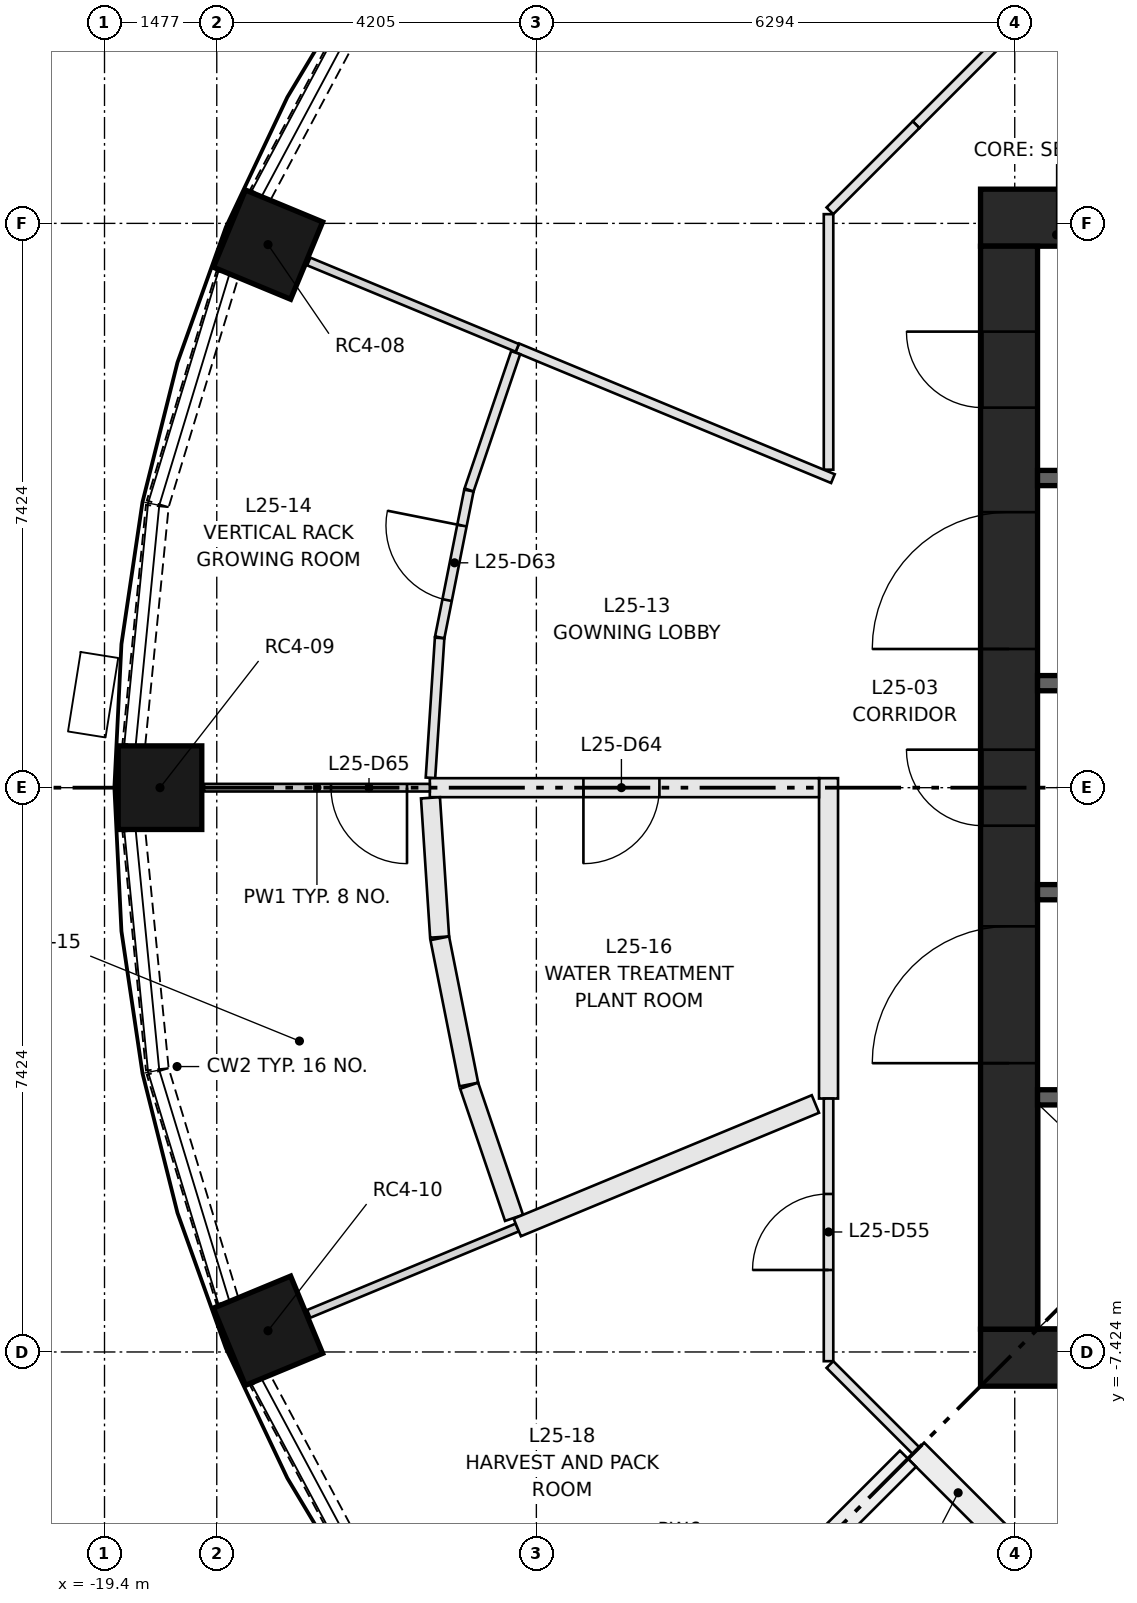
"""IFC4 building model, lengths in metres.
Left out: names, types, materials, properties, quantities, classifications, styles, units other than length and angle.
Written with IfcOpenShell. Run it as: python <this file> out.ifc"""

import sys

from ifc_helpers import new_model, si_unit, direction, frame, frame_2d, origin, origin_2d, place, context, subcontext, project, spatial, rectangle, extrude, element, fill, save


model = new_model("IFC4")
c1 = context("Model", 3, precision=1e-05, world=origin(), true_north=direction((0.0, 1.0)))
c2 = subcontext(c1, "Body", "Model", "MODEL_VIEW")
j1 = project(units=[si_unit("LENGTHUNIT", "METRE"), si_unit("PLANEANGLEUNIT", "RADIAN")], contexts=[c1])
p1 = place(None, origin())
s1 = spatial("IfcSite", under=j1, at=p1, CompositionType="ELEMENT")
p2 = place(p1, origin())
s2 = spatial("IfcBuilding", under=s1, at=p2, CompositionType="ELEMENT")
p3 = place(p2, frame((0.0, 0.0, 98.3)))
s3 = spatial("IfcBuildingStorey", under=s2, at=p3, CompositionType="ELEMENT", Elevation=98.3)
for number, where, z_axis, x_axis in (
    (1, (-17.249, 7.145, 0.0), (0.0, 0.0, 1.0), (-0.924, 0.383, 0.0)),
    (2, (-18.67, 0.0, 0.0), (0.0, 0.0, 1.0), (-1.0, 0.0, 0.0)),
    (3, (-17.249, -7.145, 0.0), (0.0, 0.0, 1.0), (-0.924, -0.383, 0.0)),
):
    element("IfcColumn", number, at=place(p3, frame(where, z_axis=z_axis, x_axis=x_axis)), inside=s3, PredefinedType="COLUMN", context=c2, shape_type="SweptSolid", body=[
        extrude(rectangle(XDim=1.1, YDim=1.1, at=origin_2d()), origin(), (0.0, 0.0, 1.0), 3.65),
    ])
for number, where, z_axis, x_axis in (
    (4, (-7.874, -7.499, 0.0), (0.0, 0.0, 1.0), (1.0, 0.0, 0.0)),
    (5, (-7.874, 7.499, 0.0), (0.0, 0.0, 1.0), (1.0, 0.0, 0.0)),
):
    element("IfcWall", number, at=place(p3, frame(where, z_axis=z_axis, x_axis=x_axis)), inside=s3, PredefinedType="SHEAR", context=c2, shape_type="SweptSolid", body=[
        extrude(rectangle(XDim=15.748, YDim=0.75, at=frame_2d((7.874, 0.0))), origin(), (0.0, 0.0, 1.0), 3.65),
    ])
p4 = place(p3, frame((-7.499, -7.124, 0.0), z_axis=(0.0, 0.0, 1.0), x_axis=(0.0, 1.0, 0.0)))
e6 = element("IfcWall", 6, at=p4, inside=s3, PredefinedType="SHEAR", context=c2, shape_type="SweptSolid", body=[
    extrude(rectangle(XDim=14.248, YDim=0.75, at=frame_2d((7.124, 0.0))), origin(), (0.0, 0.0, 1.0), 3.65),
])
p5 = place(p4, frame((6.624, 0.0, 0.0)))
e7 = element("IfcOpeningElement", 7, at=p5, cuts=e6, PredefinedType="OPENING", context=c2, shape_type="SweptSolid", body=[
    extrude(rectangle(XDim=1.0, YDim=2.1, at=frame_2d((0.5, 1.05))), frame((0.0, 0.385, 0.0), z_axis=(0.0, -1.0, 0.0), x_axis=(1.0, 0.0, 0.0)), (0.0, 0.0, 1.0), 0.77),
])
p6 = place(p4, frame((3.5, 0.0, 0.0)))
e8 = element("IfcOpeningElement", 8, at=p6, cuts=e6, PredefinedType="OPENING", context=c2, shape_type="SweptSolid", body=[
    extrude(rectangle(XDim=1.8, YDim=2.1, at=frame_2d((0.9, 1.05))), frame((0.0, 0.385, 0.0), z_axis=(0.0, -1.0, 0.0), x_axis=(1.0, 0.0, 0.0)), (0.0, 0.0, 1.0), 0.77),
])
p7 = place(p4, frame((8.948, 0.0, 0.0)))
e9 = element("IfcOpeningElement", 9, at=p7, cuts=e6, PredefinedType="OPENING", context=c2, shape_type="SweptSolid", body=[
    extrude(rectangle(XDim=1.8, YDim=2.1, at=frame_2d((0.9, 1.05))), frame((0.0, 0.385, 0.0), z_axis=(0.0, -1.0, 0.0), x_axis=(1.0, 0.0, 0.0)), (0.0, 0.0, 1.0), 0.77),
])
p8 = place(p4, frame((12.124, 0.0, 0.0)))
e10 = element("IfcOpeningElement", 10, at=p8, cuts=e6, PredefinedType="OPENING", context=c2, shape_type="SweptSolid", body=[
    extrude(rectangle(XDim=1.0, YDim=2.1, at=frame_2d((0.5, 1.05))), frame((0.0, 0.385, 0.0), z_axis=(0.0, -1.0, 0.0), x_axis=(1.0, 0.0, 0.0)), (0.0, 0.0, 1.0), 0.77),
])
p9 = place(p3, frame((-7.124, -4.074, 0.0), z_axis=(0.0, 0.0, 1.0), x_axis=(1.0, 0.0, 0.0)))
e11 = element("IfcWall", 11, at=p9, inside=s3, PredefinedType="SHEAR", context=c2, shape_type="SweptSolid", body=[
    extrude(rectangle(XDim=14.248, YDim=0.2, at=frame_2d((7.124, 0.0))), origin(), (0.0, 0.0, 1.0), 3.3),
])
p10 = place(p9, frame((1.069, 0.0, 0.0)))
e12 = element("IfcOpeningElement", 12, at=p10, cuts=e11, PredefinedType="OPENING", context=c2, shape_type="SweptSolid", body=[
    extrude(rectangle(XDim=1.1, YDim=2.1, at=frame_2d((0.55, 1.05))), frame((0.0, 0.11, 0.0), z_axis=(0.0, -1.0, 0.0), x_axis=(1.0, 0.0, 0.0)), (0.0, 0.0, 1.0), 0.22),
])
p11 = place(p9, frame((4.206, 0.0, 0.0)))
e13 = element("IfcOpeningElement", 13, at=p11, cuts=e11, PredefinedType="OPENING", context=c2, shape_type="SweptSolid", body=[
    extrude(rectangle(XDim=1.1, YDim=2.1, at=frame_2d((0.55, 1.05))), frame((0.0, 0.11, 0.0), z_axis=(0.0, -1.0, 0.0), x_axis=(1.0, 0.0, 0.0)), (0.0, 0.0, 1.0), 0.22),
])
p12 = place(p9, frame((6.808, 0.0, 0.0)))
e14 = element("IfcOpeningElement", 14, at=p12, cuts=e11, PredefinedType="OPENING", context=c2, shape_type="SweptSolid", body=[
    extrude(rectangle(XDim=1.0, YDim=2.1, at=frame_2d((0.5, 1.05))), frame((0.0, 0.11, 0.0), z_axis=(0.0, -1.0, 0.0), x_axis=(1.0, 0.0, 0.0)), (0.0, 0.0, 1.0), 0.22),
])
p13 = place(p9, frame((8.777, 0.0, 0.0)))
e15 = element("IfcOpeningElement", 15, at=p13, cuts=e11, PredefinedType="OPENING", context=c2, shape_type="SweptSolid", body=[
    extrude(rectangle(XDim=1.0, YDim=2.1, at=frame_2d((0.5, 1.05))), frame((0.0, 0.11, 0.0), z_axis=(0.0, -1.0, 0.0), x_axis=(1.0, 0.0, 0.0)), (0.0, 0.0, 1.0), 0.22),
])
p14 = place(p9, frame((10.745, 0.0, 0.0)))
e16 = element("IfcOpeningElement", 16, at=p14, cuts=e11, PredefinedType="OPENING", context=c2, shape_type="SweptSolid", body=[
    extrude(rectangle(XDim=1.0, YDim=2.1, at=frame_2d((0.5, 1.05))), frame((0.0, 0.11, 0.0), z_axis=(0.0, -1.0, 0.0), x_axis=(1.0, 0.0, 0.0)), (0.0, 0.0, 1.0), 0.22),
])
p15 = place(p9, frame((12.714, 0.0, 0.0)))
e17 = element("IfcOpeningElement", 17, at=p15, cuts=e11, PredefinedType="OPENING", context=c2, shape_type="SweptSolid", body=[
    extrude(rectangle(XDim=1.0, YDim=2.1, at=frame_2d((0.5, 1.05))), frame((0.0, 0.11, 0.0), z_axis=(0.0, -1.0, 0.0), x_axis=(1.0, 0.0, 0.0)), (0.0, 0.0, 1.0), 0.22),
])
p16 = place(p3, frame((-7.124, 4.074, 0.0), z_axis=(0.0, 0.0, 1.0), x_axis=(1.0, 0.0, 0.0)))
e18 = element("IfcWall", 18, at=p16, inside=s3, PredefinedType="SHEAR", context=c2, shape_type="SweptSolid", body=[
    extrude(rectangle(XDim=7.124, YDim=0.2, at=frame_2d((3.562, 0.0))), origin(), (0.0, 0.0, 1.0), 3.3),
])
for number, where, z_axis, x_axis in (
    (19, (-7.124, -1.375, 0.0), (0.0, 0.0, 1.0), (1.0, 0.0, 0.0)),
    (20, (-7.124, 1.375, 0.0), (0.0, 0.0, 1.0), (1.0, 0.0, 0.0)),
):
    element("IfcWall", number, at=place(p3, frame(where, z_axis=z_axis, x_axis=x_axis)), inside=s3, PredefinedType="SHEAR", context=c2, shape_type="SweptSolid", body=[
        extrude(rectangle(XDim=2.75, YDim=0.2, at=frame_2d((1.375, 0.0))), origin(), (0.0, 0.0, 1.0), 3.3),
    ])
p17 = place(p3, frame((-15.863, 10.582, 0.0), z_axis=(0.0, 0.0, 1.0), x_axis=(-0.471238306932, -0.882005928597, 0.0)))
e21 = element("IfcWall", 21, at=p17, inside=s3, PredefinedType="SOLIDWALL", context=c2, shape_type="SweptSolid", body=[
    extrude(rectangle(XDim=3.157, YDim=0.3, at=frame_2d((1.579, 0.0))), origin(), (0.0, 0.0, 1.0), 0.9),
])
p18 = place(p3, frame((-17.782, 6.756, 0.0), z_axis=(0.0, 0.0, 1.0), x_axis=(-0.290503096001, -0.956874051907, 0.0)))
e22 = element("IfcWall", 22, at=p18, inside=s3, PredefinedType="SOLIDWALL", context=c2, shape_type="SweptSolid", body=[
    extrude(rectangle(XDim=3.157, YDim=0.3, at=frame_2d((1.579, 0.0))), origin(), (0.0, 0.0, 1.0), 0.9),
])
for number, where, z_axis, x_axis in (
    (23, (-18.706, 3.705, 0.0), (0.0, 0.0, 1.0), (-0.098, -0.995, 0.0)),
    (24, (-19.014, -0.564, 0.0), (0.0, 0.0, 1.0), (0.098, -0.995, 0.0)),
):
    element("IfcWall", number, at=place(p3, frame(where, z_axis=z_axis, x_axis=x_axis)), inside=s3, PredefinedType="SOLIDWALL", context=c2, shape_type="SweptSolid", body=[
        extrude(rectangle(XDim=3.156, YDim=0.3, at=frame_2d((1.578, 0.0))), origin(), (0.0, 0.0, 1.0), 0.9),
    ])
p19 = place(p3, frame((-18.7, -3.734, 0.0), z_axis=(0.0, 0.0, 1.0), x_axis=(0.290503096001, -0.956874051907, 0.0)))
e25 = element("IfcWall", 25, at=p19, inside=s3, PredefinedType="SOLIDWALL", context=c2, shape_type="SweptSolid", body=[
    extrude(rectangle(XDim=3.157, YDim=0.3, at=frame_2d((1.579, 0.0))), origin(), (0.0, 0.0, 1.0), 0.9),
])
p20 = place(p3, frame((-17.351, -7.797, 0.0), z_axis=(0.0, 0.0, 1.0), x_axis=(0.471238306932, -0.882005928597, 0.0)))
e26 = element("IfcWall", 26, at=p20, inside=s3, PredefinedType="SOLIDWALL", context=c2, shape_type="SweptSolid", body=[
    extrude(rectangle(XDim=3.157, YDim=0.3, at=frame_2d((1.579, 0.0))), origin(), (0.0, 0.0, 1.0), 0.9),
])
p21 = place(p3, frame((-8.722, 8.722, 0.0), z_axis=(0.0, 0.0, 1.0), x_axis=(0.707030604857, 0.70718294931, 0.0)))
e27 = element("IfcWall", 27, at=p21, inside=s3, PredefinedType="PARTITIONING", context=c2, shape_type="SweptSolid", body=[
    extrude(rectangle(XDim=1.603, YDim=0.125, at=frame_2d((0.801, 0.0))), origin(), (0.0, 0.0, 1.0), 3.3),
])
p22 = place(p3, frame((-9.874, 4.183, 0.0), z_axis=(0.0, 0.0, 1.0), x_axis=(0.0, 1.0, 0.0)))
e28 = element("IfcWall", 28, at=p22, inside=s3, PredefinedType="PARTITIONING", context=c2, shape_type="SweptSolid", body=[
    extrude(rectangle(XDim=3.362, YDim=0.125, at=frame_2d((1.681, 0.0))), origin(), (0.0, 0.0, 1.0), 3.3),
])
p23 = place(p3, frame((-9.856, 7.589, 0.0), z_axis=(0.0, 0.0, 1.0), x_axis=(0.70718294931, 0.707030604857, 0.0)))
e29 = element("IfcWall", 29, at=p23, inside=s3, PredefinedType="PARTITIONING", context=c2, shape_type="SweptSolid", body=[
    extrude(rectangle(XDim=1.603, YDim=0.125, at=frame_2d((0.801, 0.0))), origin(), (0.0, 0.0, 1.0), 3.3),
])
p24 = place(p3, frame((-9.874, -4.09, 0.0), z_axis=(0.0, 0.0, 1.0), x_axis=(0.0, 1.0, 0.0)))
e30 = element("IfcWall", 30, at=p24, inside=s3, PredefinedType="PARTITIONING", context=c2, shape_type="SweptSolid", body=[
    extrude(rectangle(XDim=4.215, YDim=0.25, at=frame_2d((2.107, 0.0))), origin(), (0.0, 0.0, 1.0), 3.3),
])
p25 = place(p3, frame((-9.874, -7.545, 0.0), z_axis=(0.0, 0.0, 1.0), x_axis=(0.0, 1.0, 0.0)))
e31 = element("IfcWall", 31, at=p25, inside=s3, PredefinedType="PARTITIONING", context=c2, shape_type="SweptSolid", body=[
    extrude(rectangle(XDim=3.455, YDim=0.125, at=frame_2d((1.728, 0.0))), origin(), (0.0, 0.0, 1.0), 3.3),
])
p26 = place(p25, frame((1.2, 0.0, 0.0)))
e32 = element("IfcOpeningElement", 32, at=p26, cuts=e31, PredefinedType="OPENING", context=c2, shape_type="SweptSolid", body=[
    extrude(rectangle(XDim=1.0, YDim=2.1, at=frame_2d((0.5, 1.05))), frame((0.0, 0.073, 0.0), z_axis=(0.0, -1.0, 0.0), x_axis=(1.0, 0.0, 0.0)), (0.0, 0.0, 1.0), 0.145),
])
p27 = place(p3, frame((-8.722, -8.722, 0.0), z_axis=(0.0, 0.0, 1.0), x_axis=(-0.70718294931, 0.707030604857, 0.0)))
e33 = element("IfcWall", 33, at=p27, inside=s3, PredefinedType="PARTITIONING", context=c2, shape_type="SweptSolid", body=[
    extrude(rectangle(XDim=1.603, YDim=0.125, at=frame_2d((0.801, 0.0))), origin(), (0.0, 0.0, 1.0), 3.3),
])
p28 = place(p3, frame((-7.615, -9.83, 0.0), z_axis=(0.0, 0.0, 1.0), x_axis=(-0.707028841614, 0.70718471217, 0.0)))
e34 = element("IfcWall", 34, at=p28, inside=s3, PredefinedType="PARTITIONING", context=c2, shape_type="SweptSolid", body=[
    extrude(rectangle(XDim=1.566, YDim=0.3, at=frame_2d((0.783, 0.0))), origin(), (0.0, 0.0, 1.0), 3.3),
])
p29 = place(p3, frame((-9.816, 4.066, 0.0), z_axis=(0.0, 0.0, 1.0), x_axis=(-0.923867212496, 0.382713174158, 0.0)))
e35 = element("IfcWall", 35, at=p29, inside=s3, PredefinedType="PARTITIONING", context=c2, shape_type="SweptSolid", body=[
    extrude(rectangle(XDim=4.495, YDim=0.125, at=frame_2d((2.248, 0.0))), origin(), (0.0, 0.0, 1.0), 3.3),
])
p30 = place(p3, frame((-13.969, 5.786, 0.0), z_axis=(0.0, 0.0, 1.0), x_axis=(-0.923889594764, 0.382659139036, 0.0)))
e36 = element("IfcWall", 36, at=p30, inside=s3, PredefinedType="PARTITIONING", context=c2, shape_type="SweptSolid", body=[
    extrude(rectangle(XDim=2.97, YDim=0.11, at=frame_2d((1.485, 0.0))), origin(), (0.0, 0.0, 1.0), 3.3),
])
p31 = place(p3, frame((-15.112, 0.129, 0.0), z_axis=(0.0, 0.0, 1.0), x_axis=(0.065394347625, 0.997859498777, 0.0)))
e37 = element("IfcWall", 37, at=p31, inside=s3, PredefinedType="PARTITIONING", context=c2, shape_type="SweptSolid", body=[
    extrude(rectangle(XDim=1.844, YDim=0.125, at=frame_2d((0.922, 0.0))), origin(), (0.0, 0.0, 1.0), 3.3),
])
p32 = place(p3, frame((-14.99, 1.978, 0.0), z_axis=(0.0, 0.0, 1.0), x_axis=(0.194995562173, 0.980804124549, 0.0)))
e38 = element("IfcWall", 38, at=p32, inside=s3, PredefinedType="PARTITIONING", context=c2, shape_type="SweptSolid", body=[
    extrude(rectangle(XDim=1.969, YDim=0.125, at=frame_2d((0.985, 0.0))), origin(), (0.0, 0.0, 1.0), 3.3),
])
p33 = place(p32, frame((0.5, 0.0, 0.0)))
e39 = element("IfcOpeningElement", 39, at=p33, cuts=e38, PredefinedType="OPENING", context=c2, shape_type="SweptSolid", body=[
    extrude(rectangle(XDim=1.0, YDim=2.1, at=frame_2d((0.5, 1.05))), frame((0.0, 0.073, 0.0), z_axis=(0.0, -1.0, 0.0), x_axis=(1.0, 0.0, 0.0)), (0.0, 0.0, 1.0), 0.145),
])
p34 = place(p3, frame((-14.604, 3.917, 0.0), z_axis=(0.0, 0.0, 1.0), x_axis=(0.321484961169, 0.946914684511, 0.0)))
e40 = element("IfcWall", 40, at=p34, inside=s3, PredefinedType="PARTITIONING", context=c2, shape_type="SweptSolid", body=[
    extrude(rectangle(XDim=1.907, YDim=0.125, at=frame_2d((0.954, 0.0))), origin(), (0.0, 0.0, 1.0), 3.3),
])
p35 = place(p3, frame((-9.999, 0.0, 0.0), z_axis=(0.0, 0.0, 1.0), x_axis=(-1.0, 0.0, 0.0)))
e41 = element("IfcWall", 41, at=p35, inside=s3, PredefinedType="PARTITIONING", context=c2, shape_type="SweptSolid", body=[
    extrude(rectangle(XDim=5.121, YDim=0.25, at=frame_2d((2.561, 0.0))), origin(), (0.0, 0.0, 1.0), 3.3),
])
p36 = place(p35, frame((2.1, 0.0, 0.0)))
e42 = element("IfcOpeningElement", 42, at=p36, cuts=e41, PredefinedType="OPENING", context=c2, shape_type="SweptSolid", body=[
    extrude(rectangle(XDim=1.0, YDim=2.1, at=frame_2d((0.5, 1.05))), frame((0.0, 0.135, 0.0), z_axis=(0.0, -1.0, 0.0), x_axis=(1.0, 0.0, 0.0)), (0.0, 0.0, 1.0), 0.27),
])
p37 = place(p3, frame((-15.12, 0.0, 0.0), z_axis=(0.0, 0.0, 1.0), x_axis=(-1.0, 0.0, 0.0)))
e43 = element("IfcWall", 43, at=p37, inside=s3, PredefinedType="PARTITIONING", context=c2, shape_type="SweptSolid", body=[
    extrude(rectangle(XDim=2.97, YDim=0.1, at=frame_2d((1.485, 0.0))), origin(), (0.0, 0.0, 1.0), 3.3),
])
p38 = place(p37, frame((0.3, 0.0, 0.0)))
e44 = element("IfcOpeningElement", 44, at=p38, cuts=e43, PredefinedType="OPENING", context=c2, shape_type="SweptSolid", body=[
    extrude(rectangle(XDim=1.0, YDim=2.1, at=frame_2d((0.5, 1.05))), frame((0.0, 0.06, 0.0), z_axis=(0.0, -1.0, 0.0), x_axis=(1.0, 0.0, 0.0)), (0.0, 0.0, 1.0), 0.12),
])
p39 = place(p3, frame((-15.111, -0.133, 0.0), z_axis=(0.0, 0.0, 1.0), x_axis=(0.065424560105, -0.997857518354, 0.0)))
e45 = element("IfcWall", 45, at=p39, inside=s3, PredefinedType="PARTITIONING", context=c2, shape_type="SweptSolid", body=[
    extrude(rectangle(XDim=1.836, YDim=0.25, at=frame_2d((0.918, 0.0))), origin(), (0.0, 0.0, 1.0), 3.3),
])
p40 = place(p3, frame((-14.989, -1.982, 0.0), z_axis=(0.0, 0.0, 1.0), x_axis=(0.195062715887, -0.9807907712, 0.0)))
e46 = element("IfcWall", 46, at=p40, inside=s3, PredefinedType="PARTITIONING", context=c2, shape_type="SweptSolid", body=[
    extrude(rectangle(XDim=1.961, YDim=0.25, at=frame_2d((0.98, 0.0))), origin(), (0.0, 0.0, 1.0), 3.3),
])
p41 = place(p3, frame((-14.602, -3.921, 0.0), z_axis=(0.0, 0.0, 1.0), x_axis=(0.321528438759, -0.946899922415, 0.0)))
e47 = element("IfcWall", 47, at=p41, inside=s3, PredefinedType="PARTITIONING", context=c2, shape_type="SweptSolid", body=[
    extrude(rectangle(XDim=1.836, YDim=0.25, at=frame_2d((0.918, 0.0))), origin(), (0.0, 0.0, 1.0), 3.3),
])
p42 = place(p3, frame((-13.969, -5.786, 0.0), z_axis=(0.0, 0.0, 1.0), x_axis=(-0.923889594764, -0.382659139036, 0.0)))
e48 = element("IfcWall", 48, at=p42, inside=s3, PredefinedType="PARTITIONING", context=c2, shape_type="SweptSolid", body=[
    extrude(rectangle(XDim=2.97, YDim=0.11, at=frame_2d((1.485, 0.0))), origin(), (0.0, 0.0, 1.0), 3.3),
])
p43 = place(p3, frame((-10.047, -4.162, 0.0), z_axis=(0.0, 0.0, 1.0), x_axis=(-0.923886463326, -0.382666699469, 0.0)))
e49 = element("IfcWall", 49, at=p43, inside=s3, PredefinedType="PARTITIONING", context=c2, shape_type="SweptSolid", body=[
    extrude(rectangle(XDim=4.245, YDim=0.25, at=frame_2d((2.123, 0.0))), origin(), (0.0, 0.0, 1.0), 3.3),
])
p44 = place(p3, frame((-12.792, -12.792, 0.0), z_axis=(0.0, 0.0, 1.0), x_axis=(0.707106781187, 0.707106781187, 0.0)))
e50 = element("IfcWall", 50, at=p44, inside=s3, PredefinedType="PARTITIONING", context=c2, shape_type="SweptSolid", body=[
    extrude(rectangle(XDim=5.604, YDim=0.3, at=frame_2d((2.802, 0.0))), origin(), (0.0, 0.0, 1.0), 3.3),
])
p45 = place(p5, origin())
e51 = element("IfcDoor", 51, at=p45, inside=s3, OperationType="SINGLE_SWING_RIGHT", PredefinedType="DOOR", context=c2, shape_type="SweptSolid", body=[
    extrude(rectangle(XDim=1.0, YDim=2.1, at=frame_2d((0.5, 1.05))), frame((0.0, 0.375, 0.0), z_axis=(0.0, -1.0, 0.0), x_axis=(1.0, 0.0, 0.0)), (0.0, 0.0, 1.0), 0.05),
])
fill(e7, e51)
p46 = place(p6, origin())
e52 = element("IfcDoor", 52, at=p46, inside=s3, OperationType="DOUBLE_DOOR_SINGLE_SWING", PredefinedType="DOOR", context=c2, shape_type="SweptSolid", body=[
    extrude(rectangle(XDim=1.8, YDim=2.1, at=frame_2d((0.9, 1.05))), frame((0.0, 0.025, 0.0), z_axis=(0.0, -1.0, 0.0), x_axis=(1.0, 0.0, 0.0)), (0.0, 0.0, 1.0), 0.05),
])
fill(e8, e52)
p47 = place(p7, origin())
e53 = element("IfcDoor", 53, at=p47, inside=s3, OperationType="DOUBLE_DOOR_SINGLE_SWING", PredefinedType="DOOR", context=c2, shape_type="SweptSolid", body=[
    extrude(rectangle(XDim=1.8, YDim=2.1, at=frame_2d((0.9, 1.05))), frame((0.0, 0.025, 0.0), z_axis=(0.0, -1.0, 0.0), x_axis=(1.0, 0.0, 0.0)), (0.0, 0.0, 1.0), 0.05),
])
fill(e9, e53)
p48 = place(p8, origin())
e54 = element("IfcDoor", 54, at=p48, inside=s3, OperationType="SINGLE_SWING_RIGHT", PredefinedType="DOOR", context=c2, shape_type="SweptSolid", body=[
    extrude(rectangle(XDim=1.0, YDim=2.1, at=frame_2d((0.5, 1.05))), frame((0.0, 0.375, 0.0), z_axis=(0.0, -1.0, 0.0), x_axis=(1.0, 0.0, 0.0)), (0.0, 0.0, 1.0), 0.05),
])
fill(e10, e54)
p49 = place(p26, origin())
e55 = element("IfcDoor", 55, at=p49, inside=s3, OperationType="SINGLE_SWING_LEFT", PredefinedType="DOOR", context=c2, shape_type="SweptSolid", body=[
    extrude(rectangle(XDim=1.0, YDim=2.1, at=frame_2d((0.5, 1.05))), frame((0.0, 0.025, 0.0), z_axis=(0.0, -1.0, 0.0), x_axis=(1.0, 0.0, 0.0)), (0.0, 0.0, 1.0), 0.05),
])
fill(e32, e55)
p50 = place(p33, origin())
e56 = element("IfcDoor", 56, at=p50, inside=s3, OperationType="SINGLE_SWING_RIGHT", PredefinedType="DOOR", context=c2, shape_type="SweptSolid", body=[
    extrude(rectangle(XDim=1.0, YDim=2.1, at=frame_2d((0.5, 1.05))), frame((0.0, 0.025, 0.0), z_axis=(0.0, -1.0, 0.0), x_axis=(1.0, 0.0, 0.0)), (0.0, 0.0, 1.0), 0.05),
])
fill(e39, e56)
p51 = place(p36, origin())
e57 = element("IfcDoor", 57, at=p51, inside=s3, OperationType="SINGLE_SWING_RIGHT", PredefinedType="DOOR", context=c2, shape_type="SweptSolid", body=[
    extrude(rectangle(XDim=1.0, YDim=2.1, at=frame_2d((0.5, 1.05))), frame((0.0, 0.025, 0.0), z_axis=(0.0, -1.0, 0.0), x_axis=(1.0, 0.0, 0.0)), (0.0, 0.0, 1.0), 0.05),
])
fill(e42, e57)
p52 = place(p38, origin())
e58 = element("IfcDoor", 58, at=p52, inside=s3, OperationType="SINGLE_SWING_LEFT", PredefinedType="DOOR", context=c2, shape_type="SweptSolid", body=[
    extrude(rectangle(XDim=1.0, YDim=2.1, at=frame_2d((0.5, 1.05))), frame((0.0, 0.025, 0.0), z_axis=(0.0, -1.0, 0.0), x_axis=(1.0, 0.0, 0.0)), (0.0, 0.0, 1.0), 0.05),
])
fill(e44, e58)
save(model, sys.argv[1])
